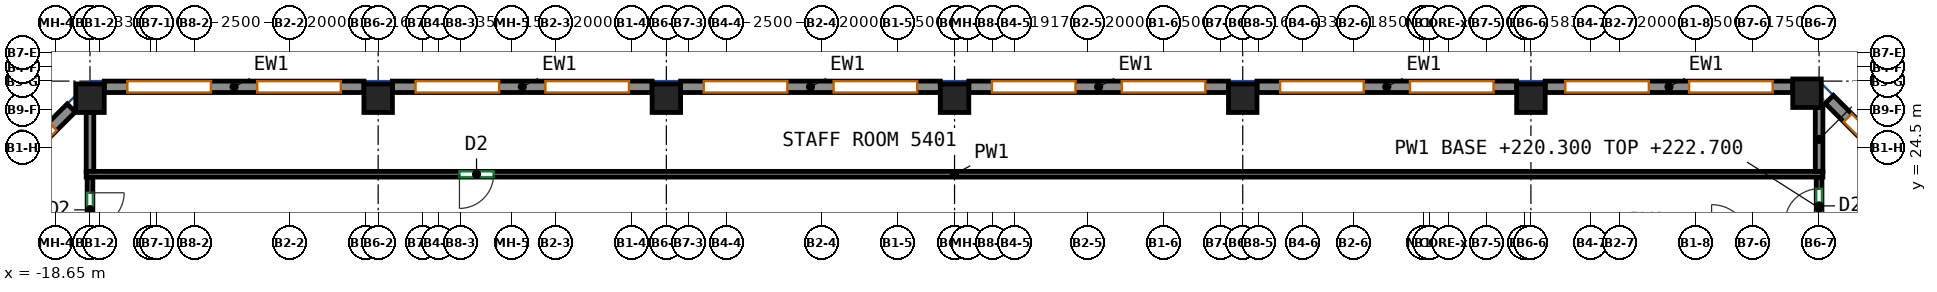
"""IFC4 building model, lengths in metres.
Left out: names, types, materials, properties, quantities, classifications, styles, units other than length and angle.
Written with IfcOpenShell. Run it as: python <this file> out.ifc"""

import sys

from ifc_helpers import new_model, si_unit, direction, frame, frame_2d, origin, origin_2d, place, context, subcontext, project, spatial, rectangle, extrude, source, transform, mapped, element, fill, save


model = new_model("IFC4")
c1 = context("Model", 3, precision=1e-05, world=origin(), true_north=direction((0.0, 1.0)))
c2 = subcontext(c1, "Body", "Model", "MODEL_VIEW")
j1 = project(units=[si_unit("LENGTHUNIT", "METRE"), si_unit("PLANEANGLEUNIT", "RADIAN")], contexts=[c1])
p1 = place(None, origin())
s1 = spatial("IfcSite", under=j1, at=p1, CompositionType="ELEMENT")
p2 = place(p1, origin())
s2 = spatial("IfcBuilding", under=s1, at=p2, CompositionType="ELEMENT")
p3 = place(p2, frame((0.0, 0.0, 220.3)))
s3 = spatial("IfcBuildingStorey", under=s2, at=p3, CompositionType="ELEMENT", Elevation=220.3)
m1 = source(origin(), c2, "Body", "SweptSolid", [
    extrude(rectangle(XDim=0.75, YDim=0.75, at=origin_2d()), origin(), (0.0, 0.0, 1.0), 3.0),
])
for number, where, z_axis, x_axis in (
    (1, (-17.75, 25.8, 0.0), (0.0, 0.0, 1.0), (1.0, 0.0, 0.0)),
    (2, (-10.167, 25.8, 0.0), (0.0, 0.0, 1.0), (1.0, 0.0, 0.0)),
    (3, (-2.583, 25.8, 0.0), (0.0, 0.0, 1.0), (1.0, 0.0, 0.0)),
    (4, (5.0, 25.8, 0.0), (0.0, 0.0, 1.0), (1.0, 0.0, 0.0)),
    (5, (12.583, 25.8, 0.0), (0.0, 0.0, 1.0), (1.0, 0.0, 0.0)),
    (6, (20.167, 25.8, 0.0), (0.0, 0.0, 1.0), (1.0, 0.0, 0.0)),
    (7, (27.432, 25.932, 0.0), (0.0, 0.0, 1.0), (1.0, 0.0, 0.0)),
):
    element("IfcColumn", number, at=place(p3, frame(where, z_axis=z_axis, x_axis=x_axis)), inside=s3, PredefinedType="COLUMN", context=c2, shape_type="MappedRepresentation", body=[
        mapped(m1, transform((0.0, 0.0, 0.0))),
    ])
m2 = source(origin(), c2, "Body", "SweptSolid", [
    extrude(rectangle(XDim=3.571, YDim=0.3, at=frame_2d((1.786, 0.0))), origin(), (0.0, 0.0, 1.0), 3.0),
])
p4 = place(p3, frame((30.544, 23.244, 0.0), z_axis=(0.0, 0.0, 1.0), x_axis=(-0.707140964879, 0.707072595841, 0.0)))
e8 = element("IfcWall", 8, at=p4, inside=s3, PredefinedType="SOLIDWALL", context=c2, shape_type="MappedRepresentation", body=[
    mapped(m2, transform((0.0, 0.0, 0.0))),
])
p5 = place(p4, frame((0.686, 0.0, 0.85)))
e9 = element("IfcOpeningElement", 9, at=p5, cuts=e8, PredefinedType="OPENING", context=c2, shape_type="SweptSolid", body=[
    extrude(rectangle(XDim=2.2, YDim=1.95, at=frame_2d((1.1, 0.975))), frame((0.0, 0.16, 0.0), z_axis=(0.0, -1.0, 0.0), x_axis=(1.0, 0.0, 0.0)), (0.0, 0.0, 1.0), 0.32),
])
m3 = source(origin(), c2, "Body", "SweptSolid", [
    extrude(rectangle(XDim=6.515, YDim=0.3, at=frame_2d((3.258, 0.0))), origin(), (0.0, 0.0, 1.0), 3.0),
])
p6 = place(p3, frame((27.057, 26.1, 0.0), z_axis=(0.0, 0.0, 1.0), x_axis=(-1.0, 0.0, 0.0)))
e10 = element("IfcWall", 10, at=p6, inside=s3, PredefinedType="SOLIDWALL", context=c2, shape_type="MappedRepresentation", body=[
    mapped(m3, transform((0.0, 0.0, 0.0))),
])
p7 = place(p6, frame((0.529, 0.0, 0.85)))
e11 = element("IfcOpeningElement", 11, at=p7, cuts=e10, PredefinedType="OPENING", context=c2, shape_type="SweptSolid", body=[
    extrude(rectangle(XDim=2.2, YDim=1.95, at=frame_2d((1.1, 0.975))), frame((0.0, 0.16, 0.0), z_axis=(0.0, -1.0, 0.0), x_axis=(1.0, 0.0, 0.0)), (0.0, 0.0, 1.0), 0.32),
])
p8 = place(p6, frame((3.786, 0.0, 0.85)))
e12 = element("IfcOpeningElement", 12, at=p8, cuts=e10, PredefinedType="OPENING", context=c2, shape_type="SweptSolid", body=[
    extrude(rectangle(XDim=2.2, YDim=1.95, at=frame_2d((1.1, 0.975))), frame((0.0, 0.16, 0.0), z_axis=(0.0, -1.0, 0.0), x_axis=(1.0, 0.0, 0.0)), (0.0, 0.0, 1.0), 0.32),
])
m4 = source(origin(), c2, "Body", "SweptSolid", [
    extrude(rectangle(XDim=6.833, YDim=0.3, at=frame_2d((3.417, 0.0))), origin(), (0.0, 0.0, 1.0), 3.0),
])
p9 = place(p3, frame((19.792, 26.1, 0.0), z_axis=(0.0, 0.0, 1.0), x_axis=(-1.0, 0.0, 0.0)))
e13 = element("IfcWall", 13, at=p9, inside=s3, PredefinedType="SOLIDWALL", context=c2, shape_type="MappedRepresentation", body=[
    mapped(m4, transform((0.0, 0.0, 0.0))),
])
p10 = place(p9, frame((0.608, 0.0, 0.85)))
e14 = element("IfcOpeningElement", 14, at=p10, cuts=e13, PredefinedType="OPENING", context=c2, shape_type="SweptSolid", body=[
    extrude(rectangle(XDim=2.2, YDim=1.95, at=frame_2d((1.1, 0.975))), frame((0.0, 0.16, 0.0), z_axis=(0.0, -1.0, 0.0), x_axis=(1.0, 0.0, 0.0)), (0.0, 0.0, 1.0), 0.32),
])
p11 = place(p9, frame((4.025, 0.0, 0.85)))
e15 = element("IfcOpeningElement", 15, at=p11, cuts=e13, PredefinedType="OPENING", context=c2, shape_type="SweptSolid", body=[
    extrude(rectangle(XDim=2.2, YDim=1.95, at=frame_2d((1.1, 0.975))), frame((0.0, 0.16, 0.0), z_axis=(0.0, -1.0, 0.0), x_axis=(1.0, 0.0, 0.0)), (0.0, 0.0, 1.0), 0.32),
])
m5 = source(origin(), c2, "Body", "SweptSolid", [
    extrude(rectangle(XDim=6.833, YDim=0.3, at=frame_2d((3.417, 0.0))), origin(), (0.0, 0.0, 1.0), 3.0),
])
p12 = place(p3, frame((12.208, 26.1, 0.0), z_axis=(0.0, 0.0, 1.0), x_axis=(-1.0, 0.0, 0.0)))
e16 = element("IfcWall", 16, at=p12, inside=s3, PredefinedType="SOLIDWALL", context=c2, shape_type="MappedRepresentation", body=[
    mapped(m5, transform((0.0, 0.0, 0.0))),
])
p13 = place(p12, frame((0.608, 0.0, 0.85)))
e17 = element("IfcOpeningElement", 17, at=p13, cuts=e16, PredefinedType="OPENING", context=c2, shape_type="SweptSolid", body=[
    extrude(rectangle(XDim=2.2, YDim=1.95, at=frame_2d((1.1, 0.975))), frame((0.0, 0.16, 0.0), z_axis=(0.0, -1.0, 0.0), x_axis=(1.0, 0.0, 0.0)), (0.0, 0.0, 1.0), 0.32),
])
p14 = place(p12, frame((4.025, 0.0, 0.85)))
e18 = element("IfcOpeningElement", 18, at=p14, cuts=e16, PredefinedType="OPENING", context=c2, shape_type="SweptSolid", body=[
    extrude(rectangle(XDim=2.2, YDim=1.95, at=frame_2d((1.1, 0.975))), frame((0.0, 0.16, 0.0), z_axis=(0.0, -1.0, 0.0), x_axis=(1.0, 0.0, 0.0)), (0.0, 0.0, 1.0), 0.32),
])
p15 = place(p3, frame((4.625, 26.1, 0.0), z_axis=(0.0, 0.0, 1.0), x_axis=(-1.0, 0.0, 0.0)))
e19 = element("IfcWall", 19, at=p15, inside=s3, PredefinedType="SOLIDWALL", context=c2, shape_type="MappedRepresentation", body=[
    mapped(m5, transform((0.0, 0.0, 0.0))),
])
p16 = place(p15, frame((0.608, 0.0, 0.85)))
e20 = element("IfcOpeningElement", 20, at=p16, cuts=e19, PredefinedType="OPENING", context=c2, shape_type="SweptSolid", body=[
    extrude(rectangle(XDim=2.2, YDim=1.95, at=frame_2d((1.1, 0.975))), frame((0.0, 0.16, 0.0), z_axis=(0.0, -1.0, 0.0), x_axis=(1.0, 0.0, 0.0)), (0.0, 0.0, 1.0), 0.32),
])
p17 = place(p15, frame((4.025, 0.0, 0.85)))
e21 = element("IfcOpeningElement", 21, at=p17, cuts=e19, PredefinedType="OPENING", context=c2, shape_type="SweptSolid", body=[
    extrude(rectangle(XDim=2.2, YDim=1.95, at=frame_2d((1.1, 0.975))), frame((0.0, 0.16, 0.0), z_axis=(0.0, -1.0, 0.0), x_axis=(1.0, 0.0, 0.0)), (0.0, 0.0, 1.0), 0.32),
])
p18 = place(p3, frame((-2.958, 26.1, 0.0), z_axis=(0.0, 0.0, 1.0), x_axis=(-1.0, 0.0, 0.0)))
e22 = element("IfcWall", 22, at=p18, inside=s3, PredefinedType="SOLIDWALL", context=c2, shape_type="MappedRepresentation", body=[
    mapped(m4, transform((0.0, 0.0, 0.0))),
])
p19 = place(p18, frame((0.608, 0.0, 0.85)))
e23 = element("IfcOpeningElement", 23, at=p19, cuts=e22, PredefinedType="OPENING", context=c2, shape_type="SweptSolid", body=[
    extrude(rectangle(XDim=2.2, YDim=1.95, at=frame_2d((1.1, 0.975))), frame((0.0, 0.16, 0.0), z_axis=(0.0, -1.0, 0.0), x_axis=(1.0, 0.0, 0.0)), (0.0, 0.0, 1.0), 0.32),
])
p20 = place(p18, frame((4.025, 0.0, 0.85)))
e24 = element("IfcOpeningElement", 24, at=p20, cuts=e22, PredefinedType="OPENING", context=c2, shape_type="SweptSolid", body=[
    extrude(rectangle(XDim=2.2, YDim=1.95, at=frame_2d((1.1, 0.975))), frame((0.0, 0.16, 0.0), z_axis=(0.0, -1.0, 0.0), x_axis=(1.0, 0.0, 0.0)), (0.0, 0.0, 1.0), 0.32),
])
p21 = place(p3, frame((-10.542, 26.1, 0.0), z_axis=(0.0, 0.0, 1.0), x_axis=(-1.0, 0.0, 0.0)))
e25 = element("IfcWall", 25, at=p21, inside=s3, PredefinedType="SOLIDWALL", context=c2, shape_type="MappedRepresentation", body=[
    mapped(m5, transform((0.0, 0.0, 0.0))),
])
p22 = place(p21, frame((0.608, 0.0, 0.85)))
e26 = element("IfcOpeningElement", 26, at=p22, cuts=e25, PredefinedType="OPENING", context=c2, shape_type="SweptSolid", body=[
    extrude(rectangle(XDim=2.2, YDim=1.95, at=frame_2d((1.1, 0.975))), frame((0.0, 0.16, 0.0), z_axis=(0.0, -1.0, 0.0), x_axis=(1.0, 0.0, 0.0)), (0.0, 0.0, 1.0), 0.32),
])
p23 = place(p21, frame((4.025, 0.0, 0.85)))
e27 = element("IfcOpeningElement", 27, at=p23, cuts=e25, PredefinedType="OPENING", context=c2, shape_type="SweptSolid", body=[
    extrude(rectangle(XDim=2.2, YDim=1.95, at=frame_2d((1.1, 0.975))), frame((0.0, 0.16, 0.0), z_axis=(0.0, -1.0, 0.0), x_axis=(1.0, 0.0, 0.0)), (0.0, 0.0, 1.0), 0.32),
])
p24 = place(p3, frame((-18.244, 25.544, 0.0), z_axis=(0.0, 0.0, 1.0), x_axis=(-0.707072595841, -0.707140964879, 0.0)))
e28 = element("IfcWall", 28, at=p24, inside=s3, PredefinedType="SOLIDWALL", context=c2, shape_type="MappedRepresentation", body=[
    mapped(m2, transform((0.0, 0.0, 0.0))),
])
p25 = place(p24, frame((0.686, 0.0, 0.85)))
e29 = element("IfcOpeningElement", 29, at=p25, cuts=e28, PredefinedType="OPENING", context=c2, shape_type="SweptSolid", body=[
    extrude(rectangle(XDim=2.2, YDim=1.95, at=frame_2d((1.1, 0.975))), frame((0.0, 0.16, 0.0), z_axis=(0.0, -1.0, 0.0), x_axis=(1.0, 0.0, 0.0)), (0.0, 0.0, 1.0), 0.32),
])
p26 = place(p3, frame((-17.75, 23.725, 0.0), z_axis=(0.0, 0.0, 1.0), x_axis=(0.0, -1.0, 0.0)))
e30 = element("IfcWall", 30, at=p26, inside=s3, PredefinedType="PARTITIONING", context=c2, shape_type="SweptSolid", body=[
    extrude(rectangle(XDim=1.725, YDim=0.15, at=frame_2d((0.863, 0.0))), origin(), (0.0, 0.0, 1.0), 3.0),
])
p27 = place(p26, frame((0.413, 0.0, 0.0)))
e31 = element("IfcOpeningElement", 31, at=p27, cuts=e30, PredefinedType="OPENING", context=c2, shape_type="SweptSolid", body=[
    extrude(rectangle(XDim=0.9, YDim=2.1, at=frame_2d((0.45, 1.05))), frame((0.0, 0.085, 0.0), z_axis=(0.0, -1.0, 0.0), x_axis=(1.0, 0.0, 0.0)), (0.0, 0.0, 1.0), 0.17),
])
p28 = place(p3, frame((27.75, 22.1, 0.0), z_axis=(0.0, 0.0, 1.0), x_axis=(0.0, 1.0, 0.0)))
e32 = element("IfcWall", 32, at=p28, inside=s3, PredefinedType="PARTITIONING", context=c2, shape_type="SweptSolid", body=[
    extrude(rectangle(XDim=1.625, YDim=0.15, at=frame_2d((0.812, 0.0))), origin(), (0.0, 0.0, 1.0), 2.4),
])
p29 = place(p28, frame((0.417, 0.0, 0.0)))
e33 = element("IfcOpeningElement", 33, at=p29, cuts=e32, PredefinedType="OPENING", context=c2, shape_type="SweptSolid", body=[
    extrude(rectangle(XDim=0.9, YDim=2.1, at=frame_2d((0.45, 1.05))), frame((0.0, 0.085, 0.0), z_axis=(0.0, -1.0, 0.0), x_axis=(1.0, 0.0, 0.0)), (0.0, 0.0, 1.0), 0.17),
])
p30 = place(p3, frame((27.85, 23.8, 0.0), z_axis=(0.0, 0.0, 1.0), x_axis=(-1.0, 0.0, 0.0)))
e34 = element("IfcWall", 34, at=p30, inside=s3, PredefinedType="PARTITIONING", context=c2, shape_type="SweptSolid", body=[
    extrude(rectangle(XDim=45.7, YDim=0.15, at=frame_2d((22.85, 0.0))), origin(), (0.0, 0.0, 1.0), 3.0),
])
p31 = place(p30, frame((34.978, 0.0, 0.0)))
e35 = element("IfcOpeningElement", 35, at=p31, cuts=e34, PredefinedType="OPENING", context=c2, shape_type="SweptSolid", body=[
    extrude(rectangle(XDim=0.9, YDim=2.1, at=frame_2d((0.45, 1.05))), frame((0.0, 0.085, 0.0), z_axis=(0.0, -1.0, 0.0), x_axis=(1.0, 0.0, 0.0)), (0.0, 0.0, 1.0), 0.17),
])
p32 = place(p3, frame((-17.75, 23.877, 0.0), z_axis=(0.0, 0.0, 1.0), x_axis=(0.0, 1.0, 0.0)))
e36 = element("IfcWall", 36, at=p32, inside=s3, PredefinedType="PARTITIONING", context=c2, shape_type="SweptSolid", body=[
    extrude(rectangle(XDim=1.548, YDim=0.2, at=frame_2d((0.774, 0.0))), origin(), (0.0, 0.0, 1.0), 3.0),
])
p33 = place(p3, frame((27.75, 25.557, 0.0), z_axis=(0.0, 0.0, 1.0), x_axis=(0.0, -1.0, 0.0)))
e37 = element("IfcWall", 37, at=p33, inside=s3, PredefinedType="PARTITIONING", context=c2, shape_type="SweptSolid", body=[
    extrude(rectangle(XDim=1.68, YDim=0.2, at=frame_2d((0.84, 0.0))), origin(), (0.0, 0.0, 1.0), 2.4),
])
p34 = place(p5, origin())
e38 = element("IfcWindow", 38, at=p34, inside=s3, PartitioningType="SINGLE_PANEL", PredefinedType="WINDOW", context=c2, shape_type="SweptSolid", body=[
    extrude(rectangle(XDim=2.2, YDim=1.95, at=frame_2d((1.1, 0.975))), frame((0.0, 0.03, 0.0), z_axis=(0.0, -1.0, 0.0), x_axis=(1.0, 0.0, 0.0)), (0.0, 0.0, 1.0), 0.06),
])
fill(e9, e38)
p35 = place(p7, origin())
e39 = element("IfcWindow", 39, at=p35, inside=s3, PartitioningType="SINGLE_PANEL", PredefinedType="WINDOW", context=c2, shape_type="SweptSolid", body=[
    extrude(rectangle(XDim=2.2, YDim=1.95, at=frame_2d((1.1, 0.975))), frame((0.0, 0.03, 0.0), z_axis=(0.0, -1.0, 0.0), x_axis=(1.0, 0.0, 0.0)), (0.0, 0.0, 1.0), 0.06),
])
fill(e11, e39)
p36 = place(p8, origin())
e40 = element("IfcWindow", 40, at=p36, inside=s3, PartitioningType="SINGLE_PANEL", PredefinedType="WINDOW", context=c2, shape_type="SweptSolid", body=[
    extrude(rectangle(XDim=2.2, YDim=1.95, at=frame_2d((1.1, 0.975))), frame((0.0, 0.03, 0.0), z_axis=(0.0, -1.0, 0.0), x_axis=(1.0, 0.0, 0.0)), (0.0, 0.0, 1.0), 0.06),
])
fill(e12, e40)
p37 = place(p10, origin())
e41 = element("IfcWindow", 41, at=p37, inside=s3, PartitioningType="SINGLE_PANEL", PredefinedType="WINDOW", context=c2, shape_type="SweptSolid", body=[
    extrude(rectangle(XDim=2.2, YDim=1.95, at=frame_2d((1.1, 0.975))), frame((0.0, 0.03, 0.0), z_axis=(0.0, -1.0, 0.0), x_axis=(1.0, 0.0, 0.0)), (0.0, 0.0, 1.0), 0.06),
])
fill(e14, e41)
p38 = place(p11, origin())
e42 = element("IfcWindow", 42, at=p38, inside=s3, PartitioningType="SINGLE_PANEL", PredefinedType="WINDOW", context=c2, shape_type="SweptSolid", body=[
    extrude(rectangle(XDim=2.2, YDim=1.95, at=frame_2d((1.1, 0.975))), frame((0.0, 0.03, 0.0), z_axis=(0.0, -1.0, 0.0), x_axis=(1.0, 0.0, 0.0)), (0.0, 0.0, 1.0), 0.06),
])
fill(e15, e42)
p39 = place(p13, origin())
e43 = element("IfcWindow", 43, at=p39, inside=s3, PartitioningType="SINGLE_PANEL", PredefinedType="WINDOW", context=c2, shape_type="SweptSolid", body=[
    extrude(rectangle(XDim=2.2, YDim=1.95, at=frame_2d((1.1, 0.975))), frame((0.0, 0.03, 0.0), z_axis=(0.0, -1.0, 0.0), x_axis=(1.0, 0.0, 0.0)), (0.0, 0.0, 1.0), 0.06),
])
fill(e17, e43)
p40 = place(p14, origin())
e44 = element("IfcWindow", 44, at=p40, inside=s3, PartitioningType="SINGLE_PANEL", PredefinedType="WINDOW", context=c2, shape_type="SweptSolid", body=[
    extrude(rectangle(XDim=2.2, YDim=1.95, at=frame_2d((1.1, 0.975))), frame((0.0, 0.03, 0.0), z_axis=(0.0, -1.0, 0.0), x_axis=(1.0, 0.0, 0.0)), (0.0, 0.0, 1.0), 0.06),
])
fill(e18, e44)
p41 = place(p16, origin())
e45 = element("IfcWindow", 45, at=p41, inside=s3, PartitioningType="SINGLE_PANEL", PredefinedType="WINDOW", context=c2, shape_type="SweptSolid", body=[
    extrude(rectangle(XDim=2.2, YDim=1.95, at=frame_2d((1.1, 0.975))), frame((0.0, 0.03, 0.0), z_axis=(0.0, -1.0, 0.0), x_axis=(1.0, 0.0, 0.0)), (0.0, 0.0, 1.0), 0.06),
])
fill(e20, e45)
p42 = place(p17, origin())
e46 = element("IfcWindow", 46, at=p42, inside=s3, PartitioningType="SINGLE_PANEL", PredefinedType="WINDOW", context=c2, shape_type="SweptSolid", body=[
    extrude(rectangle(XDim=2.2, YDim=1.95, at=frame_2d((1.1, 0.975))), frame((0.0, 0.03, 0.0), z_axis=(0.0, -1.0, 0.0), x_axis=(1.0, 0.0, 0.0)), (0.0, 0.0, 1.0), 0.06),
])
fill(e21, e46)
p43 = place(p19, origin())
e47 = element("IfcWindow", 47, at=p43, inside=s3, PartitioningType="SINGLE_PANEL", PredefinedType="WINDOW", context=c2, shape_type="SweptSolid", body=[
    extrude(rectangle(XDim=2.2, YDim=1.95, at=frame_2d((1.1, 0.975))), frame((0.0, 0.03, 0.0), z_axis=(0.0, -1.0, 0.0), x_axis=(1.0, 0.0, 0.0)), (0.0, 0.0, 1.0), 0.06),
])
fill(e23, e47)
p44 = place(p20, origin())
e48 = element("IfcWindow", 48, at=p44, inside=s3, PartitioningType="SINGLE_PANEL", PredefinedType="WINDOW", context=c2, shape_type="SweptSolid", body=[
    extrude(rectangle(XDim=2.2, YDim=1.95, at=frame_2d((1.1, 0.975))), frame((0.0, 0.03, 0.0), z_axis=(0.0, -1.0, 0.0), x_axis=(1.0, 0.0, 0.0)), (0.0, 0.0, 1.0), 0.06),
])
fill(e24, e48)
p45 = place(p22, origin())
e49 = element("IfcWindow", 49, at=p45, inside=s3, PartitioningType="SINGLE_PANEL", PredefinedType="WINDOW", context=c2, shape_type="SweptSolid", body=[
    extrude(rectangle(XDim=2.2, YDim=1.95, at=frame_2d((1.1, 0.975))), frame((0.0, 0.03, 0.0), z_axis=(0.0, -1.0, 0.0), x_axis=(1.0, 0.0, 0.0)), (0.0, 0.0, 1.0), 0.06),
])
fill(e26, e49)
p46 = place(p23, origin())
e50 = element("IfcWindow", 50, at=p46, inside=s3, PartitioningType="SINGLE_PANEL", PredefinedType="WINDOW", context=c2, shape_type="SweptSolid", body=[
    extrude(rectangle(XDim=2.2, YDim=1.95, at=frame_2d((1.1, 0.975))), frame((0.0, 0.03, 0.0), z_axis=(0.0, -1.0, 0.0), x_axis=(1.0, 0.0, 0.0)), (0.0, 0.0, 1.0), 0.06),
])
fill(e27, e50)
p47 = place(p25, origin())
e51 = element("IfcWindow", 51, at=p47, inside=s3, PartitioningType="SINGLE_PANEL", PredefinedType="WINDOW", context=c2, shape_type="SweptSolid", body=[
    extrude(rectangle(XDim=2.2, YDim=1.95, at=frame_2d((1.1, 0.975))), frame((0.0, 0.03, 0.0), z_axis=(0.0, -1.0, 0.0), x_axis=(1.0, 0.0, 0.0)), (0.0, 0.0, 1.0), 0.06),
])
fill(e29, e51)
p48 = place(p27, origin())
e52 = element("IfcDoor", 52, at=p48, inside=s3, OperationType="SINGLE_SWING_LEFT", PredefinedType="DOOR", context=c2, shape_type="SweptSolid", body=[
    extrude(rectangle(XDim=0.9, YDim=2.1, at=frame_2d((0.45, 1.05))), frame((0.0, 0.025, 0.0), z_axis=(0.0, -1.0, 0.0), x_axis=(1.0, 0.0, 0.0)), (0.0, 0.0, 1.0), 0.05),
])
fill(e31, e52)
p49 = place(p29, origin())
e53 = element("IfcDoor", 53, at=p49, inside=s3, OperationType="SINGLE_SWING_LEFT", PredefinedType="DOOR", context=c2, shape_type="SweptSolid", body=[
    extrude(rectangle(XDim=0.9, YDim=2.1, at=frame_2d((0.45, 1.05))), frame((0.0, 0.025, 0.0), z_axis=(0.0, -1.0, 0.0), x_axis=(1.0, 0.0, 0.0)), (0.0, 0.0, 1.0), 0.05),
])
fill(e33, e53)
p50 = place(p31, origin())
e54 = element("IfcDoor", 54, at=p50, inside=s3, OperationType="SINGLE_SWING_RIGHT", PredefinedType="DOOR", context=c2, shape_type="SweptSolid", body=[
    extrude(rectangle(XDim=0.9, YDim=2.1, at=frame_2d((0.45, 1.05))), frame((0.0, 0.025, 0.0), z_axis=(0.0, -1.0, 0.0), x_axis=(1.0, 0.0, 0.0)), (0.0, 0.0, 1.0), 0.05),
])
fill(e35, e54)
save(model, sys.argv[1])
